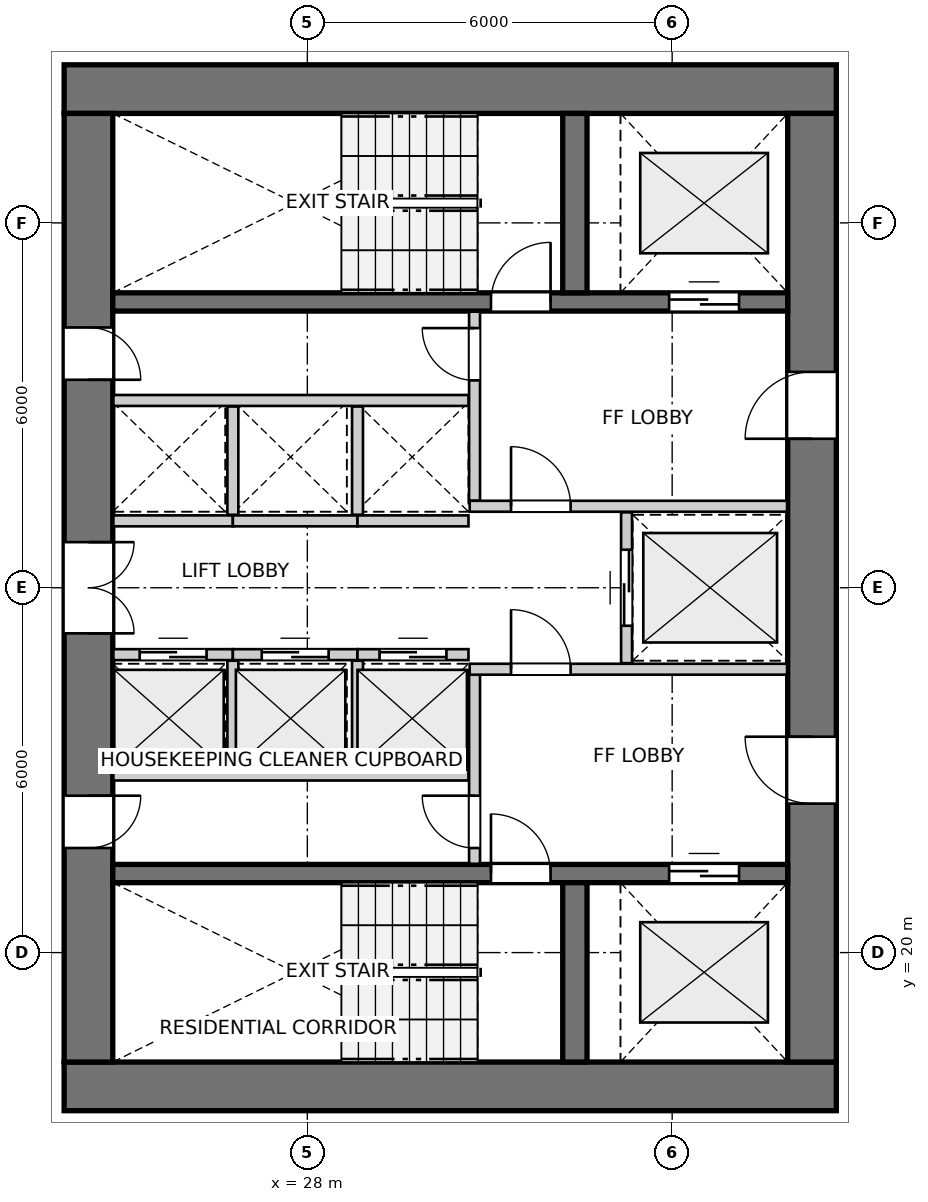
"""IFC4 building model, lengths in metres.
Left out: names, types, materials, properties, quantities, classifications, styles, units other than length and angle.
Written with IfcOpenShell. Run it as: python <this file> out.ifc"""

import sys

from ifc_helpers import new_model, si_unit, direction, frame, frame_2d, origin, place, context, subcontext, project, spatial, rectangle, extrude, source, transform, mapped, element, fill, save


model = new_model("IFC4")
c1 = context("Model", 3, precision=1e-05, world=origin(), true_north=direction((0.0, 1.0)))
c2 = subcontext(c1, "Body", "Model", "MODEL_VIEW")
j1 = project(units=[si_unit("LENGTHUNIT", "METRE"), si_unit("PLANEANGLEUNIT", "RADIAN")], contexts=[c1])
p1 = place(None, origin())
s1 = spatial("IfcSite", under=j1, at=p1, CompositionType="ELEMENT")
p2 = place(p1, origin())
s2 = spatial("IfcBuilding", under=s1, at=p2, CompositionType="ELEMENT")
p3 = place(p2, frame((0.0, 0.0, 36.6)))
s3 = spatial("IfcBuildingStorey", under=s2, at=p3, CompositionType="ELEMENT", Elevation=36.6)
for number, where, z_axis, x_axis in (
    (1, (24.0, 17.8, 0.0), (0.0, 0.0, 1.0), (1.0, 0.0, 0.0)),
    (2, (36.7, 34.2, 0.0), (0.0, 0.0, 1.0), (-1.0, 0.0, 0.0)),
):
    element("IfcWall", number, at=place(p3, frame(where, z_axis=z_axis, x_axis=x_axis)), inside=s3, PredefinedType="SHEAR", context=c2, shape_type="SweptSolid", body=[
        extrude(rectangle(XDim=12.7, YDim=0.8, at=frame_2d((6.35, 0.0))), origin(), (0.0, 0.0, 1.0), 2.94),
    ])
p4 = place(p3, frame((24.4, 33.8, 0.0), z_axis=(0.0, 0.0, 1.0), x_axis=(0.0, -1.0, 0.0)))
e3 = element("IfcWall", 3, at=p4, inside=s3, PredefinedType="SHEAR", context=c2, shape_type="SweptSolid", body=[
    extrude(rectangle(XDim=15.6, YDim=0.8, at=frame_2d((7.8, 0.0))), origin(), (0.0, 0.0, 1.0), 2.94),
])
p5 = place(p4, frame((7.05, 0.0, 0.0)))
e4 = element("IfcOpeningElement", 4, at=p5, cuts=e3, PredefinedType="OPENING", context=c2, shape_type="SweptSolid", body=[
    extrude(rectangle(XDim=1.5, YDim=2.15, at=frame_2d((0.75, 1.075))), frame((0.0, 0.41, 0.0), z_axis=(0.0, -1.0, 0.0), x_axis=(1.0, 0.0, 0.0)), (0.0, 0.0, 1.0), 0.82),
])
p6 = place(p4, frame((3.52, 0.0, 0.0)))
e5 = element("IfcOpeningElement", 5, at=p6, cuts=e3, PredefinedType="OPENING", context=c2, shape_type="SweptSolid", body=[
    extrude(rectangle(XDim=0.86, YDim=2.05, at=frame_2d((0.43, 1.025))), frame((0.0, 0.41, 0.0), z_axis=(0.0, -1.0, 0.0), x_axis=(1.0, 0.0, 0.0)), (0.0, 0.0, 1.0), 0.82),
])
p7 = place(p4, frame((11.22, 0.0, 0.0)))
e6 = element("IfcOpeningElement", 6, at=p7, cuts=e3, PredefinedType="OPENING", context=c2, shape_type="SweptSolid", body=[
    extrude(rectangle(XDim=0.86, YDim=2.05, at=frame_2d((0.43, 1.025))), frame((0.0, 0.41, 0.0), z_axis=(0.0, -1.0, 0.0), x_axis=(1.0, 0.0, 0.0)), (0.0, 0.0, 1.0), 0.82),
])
p8 = place(p3, frame((36.3, 18.2, 0.0), z_axis=(0.0, 0.0, 1.0), x_axis=(0.0, 1.0, 0.0)))
e7 = element("IfcWall", 7, at=p8, inside=s3, PredefinedType="SHEAR", context=c2, shape_type="SweptSolid", body=[
    extrude(rectangle(XDim=15.6, YDim=0.8, at=frame_2d((7.8, 0.0))), origin(), (0.0, 0.0, 1.0), 2.94),
])
p9 = place(p8, frame((4.25, 0.0, 0.0)))
e8 = element("IfcOpeningElement", 8, at=p9, cuts=e7, PredefinedType="OPENING", context=c2, shape_type="SweptSolid", body=[
    extrude(rectangle(XDim=1.1, YDim=2.15, at=frame_2d((0.55, 1.075))), frame((0.0, 0.41, 0.0), z_axis=(0.0, -1.0, 0.0), x_axis=(1.0, 0.0, 0.0)), (0.0, 0.0, 1.0), 0.82),
])
p10 = place(p8, frame((10.25, 0.0, 0.0)))
e9 = element("IfcOpeningElement", 9, at=p10, cuts=e7, PredefinedType="OPENING", context=c2, shape_type="SweptSolid", body=[
    extrude(rectangle(XDim=1.1, YDim=2.15, at=frame_2d((0.55, 1.075))), frame((0.0, 0.41, 0.0), z_axis=(0.0, -1.0, 0.0), x_axis=(1.0, 0.0, 0.0)), (0.0, 0.0, 1.0), 0.82),
])
p11 = place(p3, frame((24.8, 21.3, 0.0), z_axis=(0.0, 0.0, 1.0), x_axis=(1.0, 0.0, 0.0)))
e10 = element("IfcWall", 10, at=p11, inside=s3, PredefinedType="SHEAR", context=c2, shape_type="SweptSolid", body=[
    extrude(rectangle(XDim=11.1, YDim=0.3, at=frame_2d((5.55, 0.0))), origin(), (0.0, 0.0, 1.0), 2.94),
])
p12 = place(p11, frame((6.22, 0.0, 0.0)))
e11 = element("IfcOpeningElement", 11, at=p12, cuts=e10, PredefinedType="OPENING", context=c2, shape_type="SweptSolid", body=[
    extrude(rectangle(XDim=0.98, YDim=2.15, at=frame_2d((0.49, 1.075))), frame((0.0, 0.16, 0.0), z_axis=(0.0, -1.0, 0.0), x_axis=(1.0, 0.0, 0.0)), (0.0, 0.0, 1.0), 0.32),
])
p13 = place(p11, frame((9.15, 0.0, 0.0)))
e12 = element("IfcOpeningElement", 12, at=p13, cuts=e10, PredefinedType="OPENING", context=c2, shape_type="SweptSolid", body=[
    extrude(rectangle(XDim=1.15, YDim=2.15, at=frame_2d((0.575, 1.075))), frame((0.0, 0.16, 0.0), z_axis=(0.0, -1.0, 0.0), x_axis=(1.0, 0.0, 0.0)), (0.0, 0.0, 1.0), 0.32),
])
p14 = place(p3, frame((32.4, 18.2, 0.0), z_axis=(0.0, 0.0, 1.0), x_axis=(0.0, 1.0, 0.0)))
e13 = element("IfcWall", 13, at=p14, inside=s3, PredefinedType="SHEAR", context=c2, shape_type="SweptSolid", body=[
    extrude(rectangle(XDim=2.95, YDim=0.4, at=frame_2d((1.475, 0.0))), origin(), (0.0, 0.0, 1.0), 2.94),
])
p15 = place(p3, frame((24.8, 30.7, 0.0), z_axis=(0.0, 0.0, 1.0), x_axis=(1.0, 0.0, 0.0)))
e14 = element("IfcWall", 14, at=p15, inside=s3, PredefinedType="SHEAR", context=c2, shape_type="SweptSolid", body=[
    extrude(rectangle(XDim=11.1, YDim=0.3, at=frame_2d((5.55, 0.0))), origin(), (0.0, 0.0, 1.0), 2.94),
])
p16 = place(p15, frame((6.22, 0.0, 0.0)))
e15 = element("IfcOpeningElement", 15, at=p16, cuts=e14, PredefinedType="OPENING", context=c2, shape_type="SweptSolid", body=[
    extrude(rectangle(XDim=0.98, YDim=2.15, at=frame_2d((0.49, 1.075))), frame((0.0, 0.16, 0.0), z_axis=(0.0, -1.0, 0.0), x_axis=(1.0, 0.0, 0.0)), (0.0, 0.0, 1.0), 0.32),
])
p17 = place(p15, frame((9.15, 0.0, 0.0)))
e16 = element("IfcOpeningElement", 16, at=p17, cuts=e14, PredefinedType="OPENING", context=c2, shape_type="SweptSolid", body=[
    extrude(rectangle(XDim=1.15, YDim=2.15, at=frame_2d((0.575, 1.075))), frame((0.0, 0.16, 0.0), z_axis=(0.0, -1.0, 0.0), x_axis=(1.0, 0.0, 0.0)), (0.0, 0.0, 1.0), 0.32),
])
p18 = place(p3, frame((32.4, 30.85, 0.0), z_axis=(0.0, 0.0, 1.0), x_axis=(0.0, 1.0, 0.0)))
e17 = element("IfcWall", 17, at=p18, inside=s3, PredefinedType="SHEAR", context=c2, shape_type="SweptSolid", body=[
    extrude(rectangle(XDim=2.95, YDim=0.4, at=frame_2d((1.475, 0.0))), origin(), (0.0, 0.0, 1.0), 2.94),
])
p19 = place(p3, frame((30.75, 21.46, 0.0), z_axis=(0.0, 0.0, 1.0), x_axis=(0.0, 1.0, 0.0)))
e18 = element("IfcWall", 18, at=p19, inside=s3, PredefinedType="PARTITIONING", context=c2, shape_type="SweptSolid", body=[
    extrude(rectangle(XDim=3.11, YDim=0.18, at=frame_2d((1.555, 0.0))), origin(), (0.0, 0.0, 1.0), 2.94),
])
p20 = place(p19, frame((0.26, 0.0, 0.0)))
e19 = element("IfcOpeningElement", 19, at=p20, cuts=e18, PredefinedType="OPENING", context=c2, shape_type="SweptSolid", body=[
    extrude(rectangle(XDim=0.86, YDim=2.05, at=frame_2d((0.43, 1.025))), frame((0.0, 0.1, 0.0), z_axis=(0.0, -1.0, 0.0), x_axis=(1.0, 0.0, 0.0)), (0.0, 0.0, 1.0), 0.2),
])
p21 = place(p3, frame((30.67, 24.66, 0.0), z_axis=(0.0, 0.0, 1.0), x_axis=(1.0, 0.0, 0.0)))
e20 = element("IfcWall", 20, at=p21, inside=s3, PredefinedType="PARTITIONING", context=c2, shape_type="SweptSolid", body=[
    extrude(rectangle(XDim=5.22, YDim=0.18, at=frame_2d((2.61, 0.0))), origin(), (0.0, 0.0, 1.0), 2.94),
])
p22 = place(p21, frame((0.68, 0.0, 0.0)))
e21 = element("IfcOpeningElement", 21, at=p22, cuts=e20, PredefinedType="OPENING", context=c2, shape_type="SweptSolid", body=[
    extrude(rectangle(XDim=0.98, YDim=2.15, at=frame_2d((0.49, 1.075))), frame((0.0, 0.1, 0.0), z_axis=(0.0, -1.0, 0.0), x_axis=(1.0, 0.0, 0.0)), (0.0, 0.0, 1.0), 0.2),
])
p23 = place(p3, frame((30.75, 27.43, 0.0), z_axis=(0.0, 0.0, 1.0), x_axis=(0.0, 1.0, 0.0)))
e22 = element("IfcWall", 22, at=p23, inside=s3, PredefinedType="PARTITIONING", context=c2, shape_type="SweptSolid", body=[
    extrude(rectangle(XDim=3.11, YDim=0.18, at=frame_2d((1.555, 0.0))), origin(), (0.0, 0.0, 1.0), 2.94),
])
p24 = place(p23, frame((1.98, 0.0, 0.0)))
e23 = element("IfcOpeningElement", 23, at=p24, cuts=e22, PredefinedType="OPENING", context=c2, shape_type="SweptSolid", body=[
    extrude(rectangle(XDim=0.86, YDim=2.05, at=frame_2d((0.43, 1.025))), frame((0.0, 0.1, 0.0), z_axis=(0.0, -1.0, 0.0), x_axis=(1.0, 0.0, 0.0)), (0.0, 0.0, 1.0), 0.2),
])
p25 = place(p3, frame((30.67, 27.34, 0.0), z_axis=(0.0, 0.0, 1.0), x_axis=(1.0, 0.0, 0.0)))
e24 = element("IfcWall", 24, at=p25, inside=s3, PredefinedType="PARTITIONING", context=c2, shape_type="SweptSolid", body=[
    extrude(rectangle(XDim=5.22, YDim=0.18, at=frame_2d((2.61, 0.0))), origin(), (0.0, 0.0, 1.0), 2.94),
])
p26 = place(p25, frame((0.68, 0.0, 0.0)))
e25 = element("IfcOpeningElement", 25, at=p26, cuts=e24, PredefinedType="OPENING", context=c2, shape_type="SweptSolid", body=[
    extrude(rectangle(XDim=0.98, YDim=2.15, at=frame_2d((0.49, 1.075))), frame((0.0, 0.1, 0.0), z_axis=(0.0, -1.0, 0.0), x_axis=(1.0, 0.0, 0.0)), (0.0, 0.0, 1.0), 0.2),
])
p27 = place(p3, frame((33.25, 24.76, 0.0), z_axis=(0.0, 0.0, 1.0), x_axis=(0.0, 1.0, 0.0)))
e26 = element("IfcWall", 26, at=p27, inside=s3, PredefinedType="PARTITIONING", context=c2, shape_type="SweptSolid", body=[
    extrude(rectangle(XDim=2.48, YDim=0.18, at=frame_2d((1.24, 0.0))), origin(), (0.0, 0.0, 1.0), 2.94),
])
p28 = place(p27, frame((0.615, 0.0, 0.0)))
e27 = element("IfcOpeningElement", 27, at=p28, cuts=e26, PredefinedType="OPENING", context=c2, shape_type="SweptSolid", body=[
    extrude(rectangle(XDim=1.25, YDim=2.15, at=frame_2d((0.625, 1.075))), frame((0.0, 0.1, 0.0), z_axis=(0.0, -1.0, 0.0), x_axis=(1.0, 0.0, 0.0)), (0.0, 0.0, 1.0), 0.2),
])
p29 = place(p3, frame((24.81, 22.92, 0.0), z_axis=(0.0, 0.0, 1.0), x_axis=(1.0, 0.0, 0.0)))
e28 = element("IfcWall", 28, at=p29, inside=s3, PredefinedType="PARTITIONING", context=c2, shape_type="SweptSolid", body=[
    extrude(rectangle(XDim=5.84, YDim=0.18, at=frame_2d((2.92, 0.0))), origin(), (0.0, 0.0, 1.0), 2.94),
])
p30 = place(p3, frame((24.81, 24.9, 0.0), z_axis=(0.0, 0.0, 1.0), x_axis=(1.0, 0.0, 0.0)))
e29 = element("IfcWall", 29, at=p30, inside=s3, PredefinedType="PARTITIONING", context=c2, shape_type="SweptSolid", body=[
    extrude(rectangle(XDim=1.965, YDim=0.18, at=frame_2d((0.982, 0.0))), origin(), (0.0, 0.0, 1.0), 2.94),
])
p31 = place(p30, frame((0.433, 0.0, 0.0)))
e30 = element("IfcOpeningElement", 30, at=p31, cuts=e29, PredefinedType="OPENING", context=c2, shape_type="SweptSolid", body=[
    extrude(rectangle(XDim=1.1, YDim=2.15, at=frame_2d((0.55, 1.075))), frame((0.0, 0.1, 0.0), z_axis=(0.0, -1.0, 0.0), x_axis=(1.0, 0.0, 0.0)), (0.0, 0.0, 1.0), 0.2),
])
p32 = place(p3, frame((26.775, 24.9, 0.0), z_axis=(0.0, 0.0, 1.0), x_axis=(1.0, 0.0, 0.0)))
e31 = element("IfcWall", 31, at=p32, inside=s3, PredefinedType="PARTITIONING", context=c2, shape_type="SweptSolid", body=[
    extrude(rectangle(XDim=2.05, YDim=0.18, at=frame_2d((1.025, 0.0))), origin(), (0.0, 0.0, 1.0), 2.94),
])
p33 = place(p32, frame((0.475, 0.0, 0.0)))
e32 = element("IfcOpeningElement", 32, at=p33, cuts=e31, PredefinedType="OPENING", context=c2, shape_type="SweptSolid", body=[
    extrude(rectangle(XDim=1.1, YDim=2.15, at=frame_2d((0.55, 1.075))), frame((0.0, 0.1, 0.0), z_axis=(0.0, -1.0, 0.0), x_axis=(1.0, 0.0, 0.0)), (0.0, 0.0, 1.0), 0.2),
])
p34 = place(p3, frame((26.775, 23.02, 0.0), z_axis=(0.0, 0.0, 1.0), x_axis=(0.0, 1.0, 0.0)))
e33 = element("IfcWall", 33, at=p34, inside=s3, PredefinedType="PARTITIONING", context=c2, shape_type="SweptSolid", body=[
    extrude(rectangle(XDim=1.78, YDim=0.18, at=frame_2d((0.89, 0.0))), origin(), (0.0, 0.0, 1.0), 2.94),
])
p35 = place(p3, frame((28.825, 24.9, 0.0), z_axis=(0.0, 0.0, 1.0), x_axis=(1.0, 0.0, 0.0)))
e34 = element("IfcWall", 34, at=p35, inside=s3, PredefinedType="PARTITIONING", context=c2, shape_type="SweptSolid", body=[
    extrude(rectangle(XDim=1.825, YDim=0.18, at=frame_2d((0.913, 0.0))), origin(), (0.0, 0.0, 1.0), 2.94),
])
p36 = place(p35, frame((0.363, 0.0, 0.0)))
e35 = element("IfcOpeningElement", 35, at=p36, cuts=e34, PredefinedType="OPENING", context=c2, shape_type="SweptSolid", body=[
    extrude(rectangle(XDim=1.1, YDim=2.15, at=frame_2d((0.55, 1.075))), frame((0.0, 0.1, 0.0), z_axis=(0.0, -1.0, 0.0), x_axis=(1.0, 0.0, 0.0)), (0.0, 0.0, 1.0), 0.2),
])
p37 = place(p3, frame((28.825, 23.02, 0.0), z_axis=(0.0, 0.0, 1.0), x_axis=(0.0, 1.0, 0.0)))
e36 = element("IfcWall", 36, at=p37, inside=s3, PredefinedType="PARTITIONING", context=c2, shape_type="SweptSolid", body=[
    extrude(rectangle(XDim=1.78, YDim=0.18, at=frame_2d((0.89, 0.0))), origin(), (0.0, 0.0, 1.0), 2.94),
])
p38 = place(p3, frame((24.81, 29.08, 0.0), z_axis=(0.0, 0.0, 1.0), x_axis=(1.0, 0.0, 0.0)))
e37 = element("IfcWall", 37, at=p38, inside=s3, PredefinedType="PARTITIONING", context=c2, shape_type="SweptSolid", body=[
    extrude(rectangle(XDim=5.84, YDim=0.18, at=frame_2d((2.92, 0.0))), origin(), (0.0, 0.0, 1.0), 2.94),
])
p39 = place(p3, frame((24.81, 27.1, 0.0), z_axis=(0.0, 0.0, 1.0), x_axis=(1.0, 0.0, 0.0)))
e38 = element("IfcWall", 38, at=p39, inside=s3, PredefinedType="PARTITIONING", context=c2, shape_type="SweptSolid", body=[
    extrude(rectangle(XDim=1.965, YDim=0.18, at=frame_2d((0.982, 0.0))), origin(), (0.0, 0.0, 1.0), 2.94),
])
p40 = place(p3, frame((26.775, 27.1, 0.0), z_axis=(0.0, 0.0, 1.0), x_axis=(1.0, 0.0, 0.0)))
e39 = element("IfcWall", 39, at=p40, inside=s3, PredefinedType="PARTITIONING", context=c2, shape_type="SweptSolid", body=[
    extrude(rectangle(XDim=2.05, YDim=0.18, at=frame_2d((1.025, 0.0))), origin(), (0.0, 0.0, 1.0), 2.94),
])
p41 = place(p3, frame((26.775, 27.2, 0.0), z_axis=(0.0, 0.0, 1.0), x_axis=(0.0, 1.0, 0.0)))
e40 = element("IfcWall", 40, at=p41, inside=s3, PredefinedType="PARTITIONING", context=c2, shape_type="SweptSolid", body=[
    extrude(rectangle(XDim=1.78, YDim=0.18, at=frame_2d((0.89, 0.0))), origin(), (0.0, 0.0, 1.0), 2.94),
])
p42 = place(p3, frame((28.825, 27.1, 0.0), z_axis=(0.0, 0.0, 1.0), x_axis=(1.0, 0.0, 0.0)))
e41 = element("IfcWall", 41, at=p42, inside=s3, PredefinedType="PARTITIONING", context=c2, shape_type="SweptSolid", body=[
    extrude(rectangle(XDim=1.825, YDim=0.18, at=frame_2d((0.913, 0.0))), origin(), (0.0, 0.0, 1.0), 2.94),
])
p43 = place(p3, frame((28.825, 27.2, 0.0), z_axis=(0.0, 0.0, 1.0), x_axis=(0.0, 1.0, 0.0)))
e42 = element("IfcWall", 42, at=p43, inside=s3, PredefinedType="PARTITIONING", context=c2, shape_type="SweptSolid", body=[
    extrude(rectangle(XDim=1.78, YDim=0.18, at=frame_2d((0.89, 0.0))), origin(), (0.0, 0.0, 1.0), 2.94),
])
m1 = source(origin(), c2, "Body", "SweptSolid", [
    extrude(rectangle(XDim=0.98, YDim=2.15, at=frame_2d((0.49, 1.075))), frame((0.0, 0.025, 0.0), z_axis=(0.0, -1.0, 0.0), x_axis=(1.0, 0.0, 0.0)), (0.0, 0.0, 1.0), 0.05),
])
p44 = place(p12, origin())
e43 = element("IfcDoor", 43, at=p44, inside=s3, OperationType="SINGLE_SWING_LEFT", PredefinedType="DOOR", context=c2, shape_type="MappedRepresentation", body=[
    mapped(m1, transform((0.0, 0.0, 0.0), x_axis=(1.0, 0.0, 0.0), y_axis=(0.0, 1.0, 0.0), z_axis=(0.0, 0.0, 1.0), scale=1.0)),
])
fill(e11, e43)
m2 = source(origin(), c2, "Body", "SweptSolid", [
    extrude(rectangle(XDim=1.15, YDim=2.15, at=frame_2d((0.575, 1.075))), frame((0.0, 0.025, 0.0), z_axis=(0.0, -1.0, 0.0), x_axis=(1.0, 0.0, 0.0)), (0.0, 0.0, 1.0), 0.05),
])
p45 = place(p13, origin())
e44 = element("IfcDoor", 44, at=p45, inside=s3, OperationType="DOUBLE_DOOR_SLIDING", PredefinedType="DOOR", context=c2, shape_type="MappedRepresentation", body=[
    mapped(m2, transform((0.0, 0.0, 0.0), x_axis=(1.0, 0.0, 0.0), y_axis=(0.0, 1.0, 0.0), z_axis=(0.0, 0.0, 1.0), scale=1.0)),
])
fill(e12, e44)
p46 = place(p16, origin())
e45 = element("IfcDoor", 45, at=p46, inside=s3, OperationType="SINGLE_SWING_RIGHT", PredefinedType="DOOR", context=c2, shape_type="MappedRepresentation", body=[
    mapped(m1, transform((0.0, 0.0, 0.0), x_axis=(1.0, 0.0, 0.0), y_axis=(0.0, 1.0, 0.0), z_axis=(0.0, 0.0, 1.0), scale=1.0)),
])
fill(e15, e45)
p47 = place(p17, origin())
e46 = element("IfcDoor", 46, at=p47, inside=s3, OperationType="DOUBLE_DOOR_SLIDING", PredefinedType="DOOR", context=c2, shape_type="MappedRepresentation", body=[
    mapped(m2, transform((0.0, 0.0, 0.0), x_axis=(1.0, 0.0, 0.0), y_axis=(0.0, 1.0, 0.0), z_axis=(0.0, 0.0, 1.0), scale=1.0)),
])
fill(e16, e46)
m3 = source(origin(), c2, "Body", "SweptSolid", [
    extrude(rectangle(XDim=1.1, YDim=2.15, at=frame_2d((0.55, 1.075))), frame((0.0, 0.025, 0.0), z_axis=(0.0, -1.0, 0.0), x_axis=(1.0, 0.0, 0.0)), (0.0, 0.0, 1.0), 0.05),
])
p48 = place(p9, origin())
e47 = element("IfcDoor", 47, at=p48, inside=s3, OperationType="SINGLE_SWING_RIGHT", PredefinedType="DOOR", context=c2, shape_type="MappedRepresentation", body=[
    mapped(m3, transform((0.0, 0.0, 0.0), x_axis=(1.0, 0.0, 0.0), y_axis=(0.0, 1.0, 0.0), z_axis=(0.0, 0.0, 1.0), scale=1.0)),
])
fill(e8, e47)
p49 = place(p10, origin())
e48 = element("IfcDoor", 48, at=p49, inside=s3, OperationType="SINGLE_SWING_LEFT", PredefinedType="DOOR", context=c2, shape_type="MappedRepresentation", body=[
    mapped(m3, transform((0.0, 0.0, 0.0), x_axis=(1.0, 0.0, 0.0), y_axis=(0.0, 1.0, 0.0), z_axis=(0.0, 0.0, 1.0), scale=1.0)),
])
fill(e9, e48)
m4 = source(origin(), c2, "Body", "SweptSolid", [
    extrude(rectangle(XDim=1.5, YDim=2.15, at=frame_2d((0.75, 1.075))), frame((0.0, 0.025, 0.0), z_axis=(0.0, -1.0, 0.0), x_axis=(1.0, 0.0, 0.0)), (0.0, 0.0, 1.0), 0.05),
])
p50 = place(p5, origin())
e49 = element("IfcDoor", 49, at=p50, inside=s3, OperationType="DOUBLE_DOOR_SINGLE_SWING", PredefinedType="DOOR", context=c2, shape_type="MappedRepresentation", body=[
    mapped(m4, transform((0.0, 0.0, 0.0), x_axis=(1.0, 0.0, 0.0), y_axis=(0.0, 1.0, 0.0), z_axis=(0.0, 0.0, 1.0), scale=1.0)),
])
fill(e4, e49)
m5 = source(origin(), c2, "Body", "SweptSolid", [
    extrude(rectangle(XDim=0.86, YDim=2.05, at=frame_2d((0.43, 1.025))), frame((0.0, 0.025, 0.0), z_axis=(0.0, -1.0, 0.0), x_axis=(1.0, 0.0, 0.0)), (0.0, 0.0, 1.0), 0.05),
])
p51 = place(p6, origin())
e50 = element("IfcDoor", 50, at=p51, inside=s3, OperationType="SINGLE_SWING_RIGHT", PredefinedType="DOOR", context=c2, shape_type="MappedRepresentation", body=[
    mapped(m5, transform((0.0, 0.0, 0.0), x_axis=(1.0, 0.0, 0.0), y_axis=(0.0, 1.0, 0.0), z_axis=(0.0, 0.0, 1.0), scale=1.0)),
])
fill(e5, e50)
p52 = place(p7, origin())
e51 = element("IfcDoor", 51, at=p52, inside=s3, OperationType="SINGLE_SWING_LEFT", PredefinedType="DOOR", context=c2, shape_type="MappedRepresentation", body=[
    mapped(m5, transform((0.0, 0.0, 0.0), x_axis=(1.0, 0.0, 0.0), y_axis=(0.0, 1.0, 0.0), z_axis=(0.0, 0.0, 1.0), scale=1.0)),
])
fill(e6, e51)
p53 = place(p20, origin())
e52 = element("IfcDoor", 52, at=p53, inside=s3, OperationType="SINGLE_SWING_RIGHT", PredefinedType="DOOR", context=c2, shape_type="MappedRepresentation", body=[
    mapped(m5, transform((0.0, 0.0, 0.0), x_axis=(1.0, 0.0, 0.0), y_axis=(0.0, 1.0, 0.0), z_axis=(0.0, 0.0, 1.0), scale=1.0)),
])
fill(e19, e52)
p54 = place(p22, origin())
e53 = element("IfcDoor", 53, at=p54, inside=s3, OperationType="SINGLE_SWING_LEFT", PredefinedType="DOOR", context=c2, shape_type="MappedRepresentation", body=[
    mapped(m1, transform((0.0, 0.0, 0.0), x_axis=(1.0, 0.0, 0.0), y_axis=(0.0, 1.0, 0.0), z_axis=(0.0, 0.0, 1.0), scale=1.0)),
])
fill(e21, e53)
p55 = place(p24, origin())
e54 = element("IfcDoor", 54, at=p55, inside=s3, OperationType="SINGLE_SWING_RIGHT", PredefinedType="DOOR", context=c2, shape_type="MappedRepresentation", body=[
    mapped(m5, transform((0.0, 0.0, 0.0), x_axis=(1.0, 0.0, 0.0), y_axis=(0.0, 1.0, 0.0), z_axis=(0.0, 0.0, 1.0), scale=1.0)),
])
fill(e23, e54)
p56 = place(p26, origin())
e55 = element("IfcDoor", 55, at=p56, inside=s3, OperationType="SINGLE_SWING_LEFT", PredefinedType="DOOR", context=c2, shape_type="MappedRepresentation", body=[
    mapped(m1, transform((0.0, 0.0, 0.0), x_axis=(1.0, 0.0, 0.0), y_axis=(0.0, 1.0, 0.0), z_axis=(0.0, 0.0, 1.0), scale=1.0)),
])
fill(e25, e55)
m6 = source(origin(), c2, "Body", "SweptSolid", [
    extrude(rectangle(XDim=1.25, YDim=2.15, at=frame_2d((0.625, 1.075))), frame((0.0, 0.025, 0.0), z_axis=(0.0, -1.0, 0.0), x_axis=(1.0, 0.0, 0.0)), (0.0, 0.0, 1.0), 0.05),
])
p57 = place(p28, origin())
e56 = element("IfcDoor", 56, at=p57, inside=s3, OperationType="DOUBLE_DOOR_SLIDING", PredefinedType="DOOR", context=c2, shape_type="MappedRepresentation", body=[
    mapped(m6, transform((0.0, 0.0, 0.0), x_axis=(1.0, 0.0, 0.0), y_axis=(0.0, 1.0, 0.0), z_axis=(0.0, 0.0, 1.0), scale=1.0)),
])
fill(e27, e56)
p58 = place(p31, origin())
e57 = element("IfcDoor", 57, at=p58, inside=s3, OperationType="DOUBLE_DOOR_SLIDING", PredefinedType="DOOR", context=c2, shape_type="MappedRepresentation", body=[
    mapped(m3, transform((0.0, 0.0, 0.0), x_axis=(1.0, 0.0, 0.0), y_axis=(0.0, 1.0, 0.0), z_axis=(0.0, 0.0, 1.0), scale=1.0)),
])
fill(e30, e57)
p59 = place(p33, origin())
e58 = element("IfcDoor", 58, at=p59, inside=s3, OperationType="DOUBLE_DOOR_SLIDING", PredefinedType="DOOR", context=c2, shape_type="MappedRepresentation", body=[
    mapped(m3, transform((0.0, 0.0, 0.0), x_axis=(1.0, 0.0, 0.0), y_axis=(0.0, 1.0, 0.0), z_axis=(0.0, 0.0, 1.0), scale=1.0)),
])
fill(e32, e58)
p60 = place(p36, origin())
e59 = element("IfcDoor", 59, at=p60, inside=s3, OperationType="DOUBLE_DOOR_SLIDING", PredefinedType="DOOR", context=c2, shape_type="MappedRepresentation", body=[
    mapped(m3, transform((0.0, 0.0, 0.0), x_axis=(1.0, 0.0, 0.0), y_axis=(0.0, 1.0, 0.0), z_axis=(0.0, 0.0, 1.0), scale=1.0)),
])
fill(e35, e59)
save(model, sys.argv[1])
